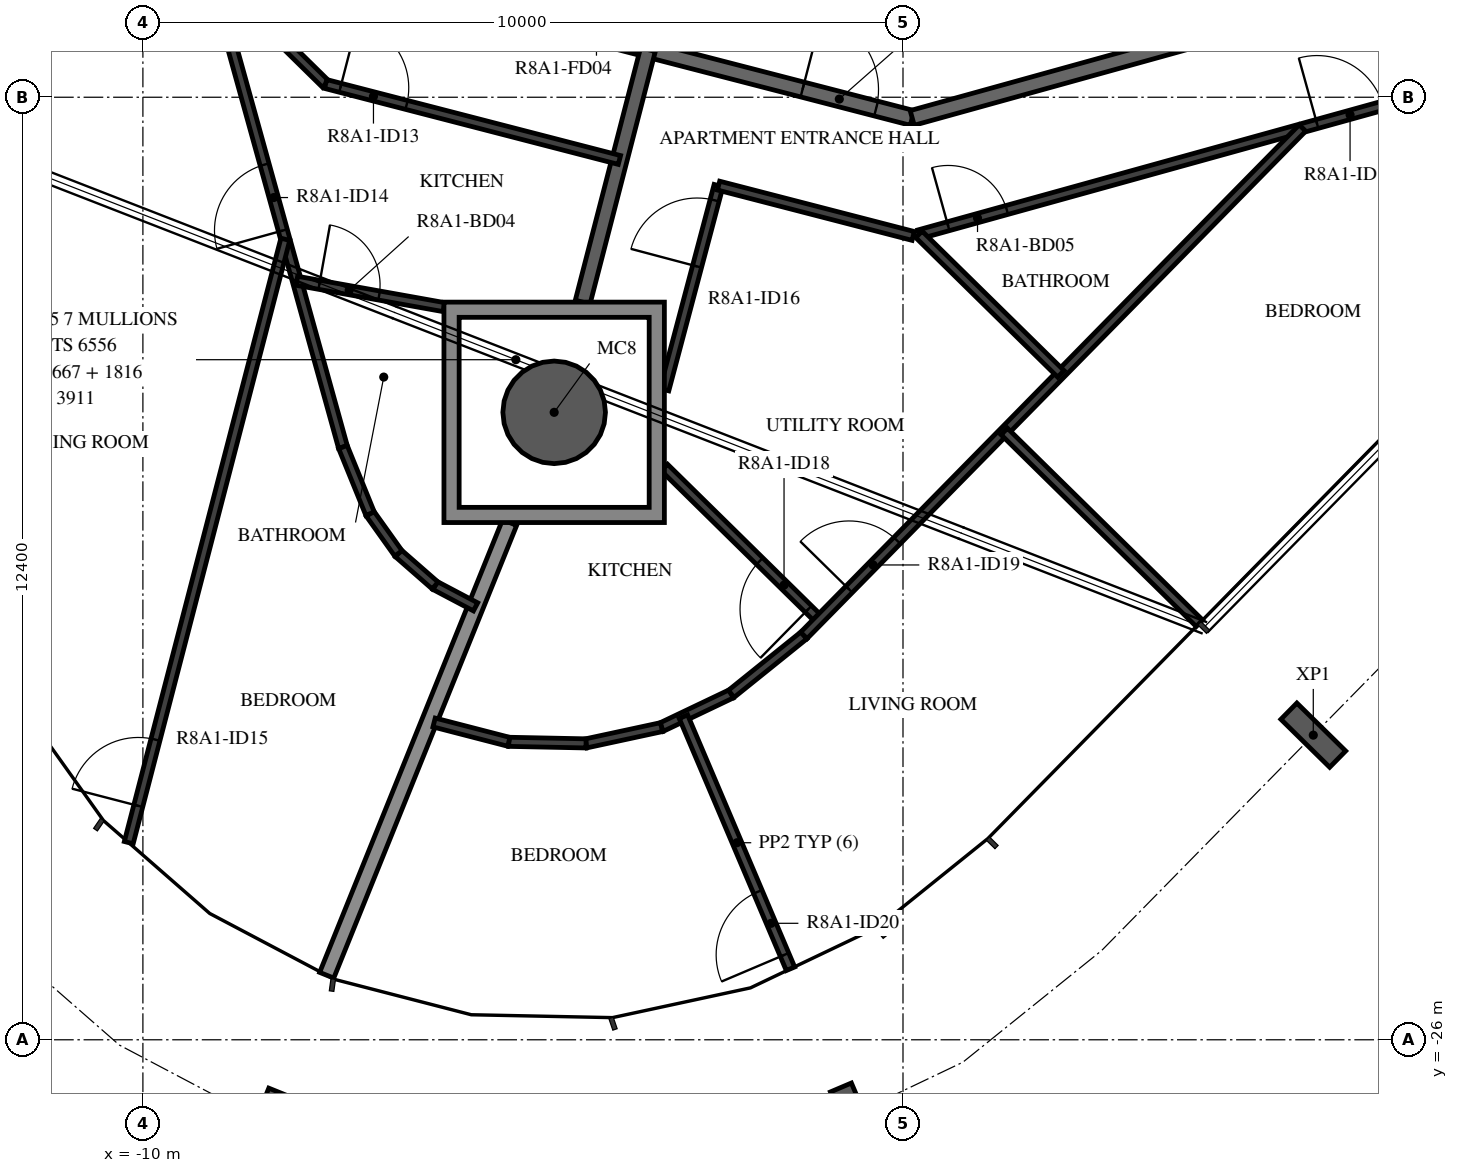
"""IFC4 building model, lengths in metres.
Left out: names, types, materials, properties, quantities, classifications, styles, units other than length and angle.
Written with IfcOpenShell. Run it as: python <this file> out.ifc"""

import sys

from ifc_helpers import new_model, si_unit, direction, frame, frame_2d, origin, origin_2d, place, context, subcontext, project, spatial, polyline, rectangle, hollow_circle, i_section, outline, extrude, element, fill, save


model = new_model("IFC4")
c1 = context("Model", 3, precision=1e-05, world=origin(), true_north=direction((0.0, 1.0)))
c2 = subcontext(c1, "Body", "Model", "MODEL_VIEW")
j1 = project(units=[si_unit("LENGTHUNIT", "METRE"), si_unit("PLANEANGLEUNIT", "RADIAN")], contexts=[c1])
p1 = place(None, origin())
s1 = spatial("IfcSite", under=j1, at=p1, CompositionType="ELEMENT")
p2 = place(p1, origin())
s2 = spatial("IfcBuilding", under=s1, at=p2, CompositionType="ELEMENT")
p3 = place(p2, frame((0.0, 0.0, 301.7)))
s3 = spatial("IfcBuildingStorey", under=s2, at=p3, CompositionType="ELEMENT", Elevation=301.7)
p4 = place(p3, frame((-4.589, -17.745, -0.38), z_axis=(0.0, 0.0, 1.0), x_axis=(1.0, 0.0, 0.0)))
e1 = element("IfcColumn", 1, at=p4, inside=s3, PredefinedType="COLUMN", context=c2, shape_type="SweptSolid", body=[
    extrude(hollow_circle(Radius=0.675, WallThickness=0.03, at=origin_2d()), origin(), (0.0, 0.0, 1.0), 3.5),
])
for number, where, z_axis, x_axis in (
    (2, (-8.373, -27.11, -0.38), (0.0, 0.0, 1.0), (-0.927, 0.375, 0.0)),
    (3, (-0.641, -27.042, -0.38), (0.0, 0.0, 1.0), (-0.92, -0.391, 0.0)),
    (4, (5.398, -21.992, -0.38), (0.0, 0.0, 1.0), (-0.701, -0.713, 0.0)),
):
    element("IfcColumn", number, at=place(p3, frame(where, z_axis=z_axis, x_axis=x_axis)), inside=s3, PredefinedType="COLUMN", context=c2, shape_type="SweptSolid", body=[
        extrude(i_section(OverallWidth=0.3, OverallDepth=0.9, WebThickness=0.019, FlangeThickness=0.035, FilletRadius=0.03, at=origin_2d()), origin(), (0.0, 0.0, 1.0), 3.5),
    ])
p5 = place(p3, frame((-6.831, -12.074, 0.0), z_axis=(0.0, 0.0, 1.0), x_axis=(0.968144780225, -0.250391063186, 0.0)))
e5 = element("IfcWall", 5, at=p5, inside=s3, PredefinedType="STANDARD", context=c2, shape_type="SweptSolid", body=[
    extrude(rectangle(XDim=7.181, YDim=0.2, at=frame_2d((3.591, 0.0))), origin(), (0.0, 0.0, 1.0), 3.12),
])
p6 = place(p5, frame((2.39, 0.0, 0.0)))
e6 = element("IfcOpeningElement", 6, at=p6, cuts=e5, PredefinedType="OPENING", context=c2, shape_type="SweptSolid", body=[
    extrude(rectangle(XDim=1.0, YDim=2.1, at=frame_2d((0.5, 1.05))), frame((0.0, 0.11, 0.0), z_axis=(0.0, -1.0, 0.0), x_axis=(1.0, 0.0, 0.0)), (0.0, 0.0, 1.0), 0.22),
])
p7 = place(p5, frame((5.69, 0.0, 0.0)))
e7 = element("IfcOpeningElement", 7, at=p7, cuts=e5, PredefinedType="OPENING", context=c2, shape_type="SweptSolid", body=[
    extrude(rectangle(XDim=1.0, YDim=2.1, at=frame_2d((0.5, 1.05))), frame((0.0, 0.11, 0.0), z_axis=(0.0, -1.0, 0.0), x_axis=(1.0, 0.0, 0.0)), (0.0, 0.0, 1.0), 0.22),
])
p8 = place(p3, frame((0.121, -13.872, 0.0), z_axis=(0.0, 0.0, 1.0), x_axis=(0.963625960674, 0.267254575108, 0.0)))
e8 = element("IfcWall", 8, at=p8, inside=s3, PredefinedType="STANDARD", context=c2, shape_type="SweptSolid", body=[
    extrude(rectangle(XDim=7.181, YDim=0.2, at=frame_2d((3.591, 0.0))), origin(), (0.0, 0.0, 1.0), 3.12),
])
p9 = place(p3, frame((-4.214, -16.295, 0.0), z_axis=(0.0, 0.0, 1.0), x_axis=(0.250428810918, 0.968135016752, 0.0)))
e9 = element("IfcWall", 9, at=p9, inside=s3, PredefinedType="STANDARD", context=c2, shape_type="SweptSolid", body=[
    extrude(rectangle(XDim=3.432, YDim=0.2, at=frame_2d((1.716, 0.0))), origin(), (0.0, 0.0, 1.0), 3.12),
])
p10 = place(p3, frame((-7.582, -25.151, 0.0), z_axis=(0.0, 0.0, 1.0), x_axis=(0.374645287615, 0.927168220156, 0.0)))
e10 = element("IfcWall", 10, at=p10, inside=s3, PredefinedType="STANDARD", context=c2, shape_type="SweptSolid", body=[
    extrude(rectangle(XDim=6.423, YDim=0.2, at=frame_2d((3.212, 0.0))), origin(), (0.0, 0.0, 1.0), 2.73),
])
p11 = place(p3, frame((-10.59, -10.483, 0.0), z_axis=(0.0, 0.0, 1.0), x_axis=(0.713244109461, -0.70091571556, 0.0)))
e11 = element("IfcWall", 11, at=p11, inside=s3, PredefinedType="PARTITIONING", context=c2, shape_type="SweptSolid", body=[
    extrude(rectangle(XDim=4.198, YDim=0.12, at=frame_2d((2.099, 0.0))), origin(), (0.0, 0.0, 1.0), 3.12),
])
p12 = place(p3, frame((-7.596, -13.426, 0.0), z_axis=(0.0, 0.0, 1.0), x_axis=(0.96815406745, -0.250355151095, 0.0)))
e12 = element("IfcWall", 12, at=p12, inside=s3, PredefinedType="PARTITIONING", context=c2, shape_type="SweptSolid", body=[
    extrude(rectangle(XDim=3.992, YDim=0.12, at=frame_2d((1.996, 0.0))), origin(), (0.0, 0.0, 1.0), 3.12),
])
p13 = place(p12, frame((0.2, 0.0, 0.0)))
e13 = element("IfcOpeningElement", 13, at=p13, cuts=e12, PredefinedType="OPENING", context=c2, shape_type="SweptSolid", body=[
    extrude(rectangle(XDim=0.9, YDim=2.1, at=frame_2d((0.45, 1.05))), frame((0.0, 0.07, 0.0), z_axis=(0.0, -1.0, 0.0), x_axis=(1.0, 0.0, 0.0)), (0.0, 0.0, 1.0), 0.14),
])
p14 = place(p3, frame((-14.066, -13.508, 0.0), z_axis=(0.0, 0.0, 1.0), x_axis=(0.963643585504, 0.267191018032, 0.0)))
e14 = element("IfcWall", 14, at=p14, inside=s3, PredefinedType="PARTITIONING", context=c2, shape_type="SweptSolid", body=[
    extrude(rectangle(XDim=5.2, YDim=0.12, at=frame_2d((2.6, 0.0))), origin(), (0.0, 0.0, 1.0), 2.73),
])
p15 = place(p3, frame((-7.368, -18.202, 0.0), z_axis=(0.0, 0.0, 1.0), x_axis=(-0.26723158658, 0.963632336077, 0.0)))
e15 = element("IfcWall", 15, at=p15, inside=s3, PredefinedType="PARTITIONING", context=c2, shape_type="SweptSolid", body=[
    extrude(rectangle(XDim=6.353, YDim=0.12, at=frame_2d((3.177, 0.0))), origin(), (0.0, 0.0, 1.0), 3.12),
])
p16 = place(p15, frame((2.956, 0.0, 0.0)))
e16 = element("IfcOpeningElement", 16, at=p16, cuts=e15, PredefinedType="OPENING", context=c2, shape_type="SweptSolid", body=[
    extrude(rectangle(XDim=0.9, YDim=2.1, at=frame_2d((0.45, 1.05))), frame((0.0, 0.07, 0.0), z_axis=(0.0, -1.0, 0.0), x_axis=(1.0, 0.0, 0.0)), (0.0, 0.0, 1.0), 0.14),
])
p17 = place(p3, frame((-10.186, -23.406, 0.0), z_axis=(0.0, 0.0, 1.0), x_axis=(0.251184292323, 0.967939280787, 0.0)))
e17 = element("IfcWall", 17, at=p17, inside=s3, PredefinedType="PARTITIONING", context=c2, shape_type="SweptSolid", body=[
    extrude(rectangle(XDim=8.2, YDim=0.12, at=frame_2d((4.1, 0.0))), origin(), (0.0, 0.0, 1.0), 3.12),
])
p18 = place(p17, frame((0.5, 0.0, 0.0)))
e18 = element("IfcOpeningElement", 18, at=p18, cuts=e17, PredefinedType="OPENING", context=c2, shape_type="SweptSolid", body=[
    extrude(rectangle(XDim=0.9, YDim=2.1, at=frame_2d((0.45, 1.05))), frame((0.0, 0.07, 0.0), z_axis=(0.0, -1.0, 0.0), x_axis=(1.0, 0.0, 0.0)), (0.0, 0.0, 1.0), 0.14),
])
p19 = place(p3, frame((-7.975, -16.015, 0.0), z_axis=(0.0, 0.0, 1.0), x_axis=(0.984356897167, -0.176185978441, 0.0)))
e19 = element("IfcWall", 19, at=p19, inside=s3, PredefinedType="PARTITIONING", context=c2, shape_type="SweptSolid", body=[
    extrude(rectangle(XDim=1.966, YDim=0.12, at=frame_2d((0.983, 0.0))), origin(), (0.0, 0.0, 1.0), 3.12),
])
p20 = place(p19, frame((0.3, 0.0, 0.0)))
e20 = element("IfcOpeningElement", 20, at=p20, cuts=e19, PredefinedType="OPENING", context=c2, shape_type="SweptSolid", body=[
    extrude(rectangle(XDim=0.8, YDim=2.1, at=frame_2d((0.4, 1.05))), frame((0.0, 0.07, 0.0), z_axis=(0.0, -1.0, 0.0), x_axis=(1.0, 0.0, 0.0)), (0.0, 0.0, 1.0), 0.14),
])
p21 = place(p3, frame((-5.623, -20.305, 0.0), z_axis=(0.0, 0.0, 1.0), x_axis=(-0.884133271246, 0.467234800369, 0.0)))
e21 = element("IfcWall", 21, at=p21, inside=s3, PredefinedType="PARTITIONING", context=c2, shape_type="SweptSolid", body=[
    extrude(rectangle(XDim=0.601, YDim=0.12, at=frame_2d((0.301, 0.0))), origin(), (0.0, 0.0, 1.0), 3.12),
])
p22 = place(p3, frame((-6.155, -20.024, 0.0), z_axis=(0.0, 0.0, 1.0), x_axis=(-0.753047703781, 0.657965923001, 0.0)))
e22 = element("IfcWall", 22, at=p22, inside=s3, PredefinedType="PARTITIONING", context=c2, shape_type="SweptSolid", body=[
    extrude(rectangle(XDim=0.642, YDim=0.12, at=frame_2d((0.321, 0.0))), origin(), (0.0, 0.0, 1.0), 3.12),
])
p23 = place(p3, frame((-6.638, -19.601, 0.0), z_axis=(0.0, 0.0, 1.0), x_axis=(-0.580662514246, 0.814144363458, 0.0)))
e23 = element("IfcWall", 23, at=p23, inside=s3, PredefinedType="PARTITIONING", context=c2, shape_type="SweptSolid", body=[
    extrude(rectangle(XDim=0.642, YDim=0.12, at=frame_2d((0.321, 0.0))), origin(), (0.0, 0.0, 1.0), 3.12),
])
p24 = place(p3, frame((-7.011, -19.079, 0.0), z_axis=(0.0, 0.0, 1.0), x_axis=(-0.377296887314, 0.92609235977, 0.0)))
e24 = element("IfcWall", 24, at=p24, inside=s3, PredefinedType="PARTITIONING", context=c2, shape_type="SweptSolid", body=[
    extrude(rectangle(XDim=0.947, YDim=0.12, at=frame_2d((0.473, 0.0))), origin(), (0.0, 0.0, 1.0), 3.12),
])
p25 = place(p3, frame((-3.139, -17.448, 0.0), z_axis=(0.0, 0.0, 1.0), x_axis=(0.256551998295, 0.966530430028, 0.0)))
e25 = element("IfcWall", 25, at=p25, inside=s3, PredefinedType="PARTITIONING", context=c2, shape_type="SweptSolid", body=[
    extrude(rectangle(XDim=2.778, YDim=0.12, at=frame_2d((1.389, 0.0))), origin(), (0.0, 0.0, 1.0), 3.12),
])
p26 = place(p25, frame((1.678, 0.0, 0.0)))
e26 = element("IfcOpeningElement", 26, at=p26, cuts=e25, PredefinedType="OPENING", context=c2, shape_type="SweptSolid", body=[
    extrude(rectangle(XDim=0.9, YDim=2.1, at=frame_2d((0.45, 1.05))), frame((0.0, 0.07, 0.0), z_axis=(0.0, -1.0, 0.0), x_axis=(1.0, 0.0, 0.0)), (0.0, 0.0, 1.0), 0.14),
])
p27 = place(p3, frame((-2.427, -14.763, 0.0), z_axis=(0.0, 0.0, 1.0), x_axis=(0.968151154118, -0.250366417036, 0.0)))
e27 = element("IfcWall", 27, at=p27, inside=s3, PredefinedType="PARTITIONING", context=c2, shape_type="SweptSolid", body=[
    extrude(rectangle(XDim=2.646, YDim=0.12, at=frame_2d((1.323, 0.0))), origin(), (0.0, 0.0, 1.0), 3.12),
])
p28 = place(p3, frame((0.21, -15.404, 0.0), z_axis=(0.0, 0.0, 1.0), x_axis=(0.963630625717, 0.267237754032, 0.0)))
e28 = element("IfcWall", 28, at=p28, inside=s3, PredefinedType="PARTITIONING", context=c2, shape_type="SweptSolid", body=[
    extrude(rectangle(XDim=7.907, YDim=0.12, at=frame_2d((3.954, 0.0))), origin(), (0.0, 0.0, 1.0), 3.12),
])
p29 = place(p28, frame((0.4, 0.0, 0.0)))
e29 = element("IfcOpeningElement", 29, at=p29, cuts=e28, PredefinedType="OPENING", context=c2, shape_type="SweptSolid", body=[
    extrude(rectangle(XDim=0.8, YDim=2.1, at=frame_2d((0.4, 1.05))), frame((0.0, 0.07, 0.0), z_axis=(0.0, -1.0, 0.0), x_axis=(1.0, 0.0, 0.0)), (0.0, 0.0, 1.0), 0.14),
])
p30 = place(p28, frame((5.436, 0.0, 0.0)))
e30 = element("IfcOpeningElement", 30, at=p30, cuts=e28, PredefinedType="OPENING", context=c2, shape_type="SweptSolid", body=[
    extrude(rectangle(XDim=0.9, YDim=2.1, at=frame_2d((0.45, 1.05))), frame((0.0, 0.07, 0.0), z_axis=(0.0, -1.0, 0.0), x_axis=(1.0, 0.0, 0.0)), (0.0, 0.0, 1.0), 0.14),
])
p31 = place(p3, frame((-2.26, -21.449, 0.0), z_axis=(0.0, 0.0, 1.0), x_axis=(-0.90254047062, -0.430605038166, 0.0)))
e31 = element("IfcWall", 31, at=p31, inside=s3, PredefinedType="PARTITIONING", context=c2, shape_type="SweptSolid", body=[
    extrude(rectangle(XDim=1.016, YDim=0.12, at=frame_2d((0.508, 0.0))), origin(), (0.0, 0.0, 1.0), 3.12),
])
for number, where, z_axis, x_axis in (
    (32, (-3.177, -21.887, 0.0), (0.0, 0.0, 1.0), (-0.978, -0.211, 0.0)),
    (33, (-4.17, -22.101, 0.0), (0.0, 0.0, 1.0), (-1.0, 0.02, 0.0)),
):
    element("IfcWall", number, at=place(p3, frame(where, z_axis=z_axis, x_axis=x_axis)), inside=s3, PredefinedType="PARTITIONING", context=c2, shape_type="SweptSolid", body=[
        extrude(rectangle(XDim=1.016, YDim=0.12, at=frame_2d((0.508, 0.0))), origin(), (0.0, 0.0, 1.0), 3.12),
    ])
p32 = place(p3, frame((-5.186, -22.08, 0.0), z_axis=(0.0, 0.0, 1.0), x_axis=(-0.968145907309, 0.250386705241, 0.0)))
e34 = element("IfcWall", 34, at=p32, inside=s3, PredefinedType="PARTITIONING", context=c2, shape_type="SweptSolid", body=[
    extrude(rectangle(XDim=1.016, YDim=0.12, at=frame_2d((0.508, 0.0))), origin(), (0.0, 0.0, 1.0), 3.12),
])
p33 = place(p3, frame((-1.48, -25.066, 0.0), z_axis=(0.0, 0.0, 1.0), x_axis=(-0.3909326022, 0.920419306912, 0.0)))
e35 = element("IfcWall", 35, at=p33, inside=s3, PredefinedType="PARTITIONING", context=c2, shape_type="SweptSolid", body=[
    extrude(rectangle(XDim=3.604, YDim=0.12, at=frame_2d((1.802, 0.0))), origin(), (0.0, 0.0, 1.0), 2.73),
])
p34 = place(p33, frame((0.2, 0.0, 0.0)))
e36 = element("IfcOpeningElement", 36, at=p34, cuts=e35, PredefinedType="OPENING", context=c2, shape_type="SweptSolid", body=[
    extrude(rectangle(XDim=0.9, YDim=2.1, at=frame_2d((0.45, 1.05))), frame((0.0, 0.07, 0.0), z_axis=(0.0, -1.0, 0.0), x_axis=(1.0, 0.0, 0.0)), (0.0, 0.0, 1.0), 0.14),
])
p35 = place(p3, frame((-1.101, -20.474, 0.0), z_axis=(0.0, 0.0, 1.0), x_axis=(-0.713316946232, 0.700841589961, 0.0)))
e37 = element("IfcWall", 37, at=p35, inside=s3, PredefinedType="PARTITIONING", context=c2, shape_type="SweptSolid", body=[
    extrude(rectangle(XDim=2.857, YDim=0.12, at=frame_2d((1.429, 0.0))), origin(), (0.0, 0.0, 1.0), 3.12),
])
p36 = place(p35, frame((0.2, 0.0, 0.0)))
e38 = element("IfcOpeningElement", 38, at=p36, cuts=e37, PredefinedType="OPENING", context=c2, shape_type="SweptSolid", body=[
    extrude(rectangle(XDim=0.9, YDim=2.1, at=frame_2d((0.45, 1.05))), frame((0.0, 0.07, 0.0), z_axis=(0.0, -1.0, 0.0), x_axis=(1.0, 0.0, 0.0)), (0.0, 0.0, 1.0), 0.14),
])
p37 = place(p3, frame((-2.26, -21.449, 0.0), z_axis=(0.0, 0.0, 1.0), x_axis=(0.779021167429, 0.626997624156, 0.0)))
e39 = element("IfcWall", 39, at=p37, inside=s3, PredefinedType="PARTITIONING", context=c2, shape_type="SweptSolid", body=[
    extrude(rectangle(XDim=1.227, YDim=0.12, at=frame_2d((0.614, 0.0))), origin(), (0.0, 0.0, 1.0), 3.12),
])
p38 = place(p3, frame((-1.304, -20.68, 0.0), z_axis=(0.0, 0.0, 1.0), x_axis=(0.700896976526, 0.713262524108, 0.0)))
e40 = element("IfcWall", 40, at=p38, inside=s3, PredefinedType="PARTITIONING", context=c2, shape_type="SweptSolid", body=[
    extrude(rectangle(XDim=9.358, YDim=0.12, at=frame_2d((4.679, 0.0))), origin(), (0.0, 0.0, 1.0), 3.12),
])
p39 = place(p38, frame((0.849, 0.0, 0.0)))
e41 = element("IfcOpeningElement", 41, at=p39, cuts=e40, PredefinedType="OPENING", context=c2, shape_type="SweptSolid", body=[
    extrude(rectangle(XDim=0.9, YDim=2.1, at=frame_2d((0.45, 1.05))), frame((0.0, 0.07, 0.0), z_axis=(0.0, -1.0, 0.0), x_axis=(1.0, 0.0, 0.0)), (0.0, 0.0, 1.0), 0.14),
])
p40 = place(p3, frame((2.077, -17.239, 0.0), z_axis=(0.0, 0.0, 1.0), x_axis=(-0.713235001716, 0.700924983381, 0.0)))
e42 = element("IfcWall", 42, at=p40, inside=s3, PredefinedType="PARTITIONING", context=c2, shape_type="SweptSolid", body=[
    extrude(rectangle(XDim=2.618, YDim=0.12, at=frame_2d((1.309, 0.0))), origin(), (0.0, 0.0, 1.0), 3.12),
])
p41 = place(p3, frame((3.9, -20.521, 0.0), z_axis=(0.0, 0.0, 1.0), x_axis=(-0.713217465002, 0.700942827637, 0.0)))
e43 = element("IfcWall", 43, at=p41, inside=s3, PredefinedType="PARTITIONING", context=c2, shape_type="SweptSolid", body=[
    extrude(rectangle(XDim=3.6, YDim=0.12, at=frame_2d((1.8, 0.0))), origin(), (0.0, 0.0, 1.0), 2.73),
])
p42 = place(p3, origin())
e44 = element("IfcWall", 44, at=p42, inside=s3, PredefinedType="STANDARD", context=c2, shape_type="SweptSolid", body=[
    extrude(outline(polyline([(-3.139, -16.295), (-3.139, -19.195), (-6.039, -19.195), (-6.039, -16.295), (-3.139, -16.295)]), holes=[polyline([(-5.839, -18.995), (-3.339, -18.995), (-3.339, -16.495), (-5.839, -16.495), (-5.839, -18.995)])]), origin(), (0.0, 0.0, 1.0), 3.12),
])
p43 = place(p13, origin())
e45 = element("IfcDoor", 45, at=p43, inside=s3, OperationType="SINGLE_SWING_RIGHT", PredefinedType="DOOR", context=c2, shape_type="SweptSolid", body=[
    extrude(rectangle(XDim=0.9, YDim=2.1, at=frame_2d((0.45, 1.05))), frame((0.0, 0.025, 0.0), z_axis=(0.0, -1.0, 0.0), x_axis=(1.0, 0.0, 0.0)), (0.0, 0.0, 1.0), 0.05),
])
fill(e13, e45)
p44 = place(p16, origin())
e46 = element("IfcDoor", 46, at=p44, inside=s3, OperationType="SINGLE_SWING_RIGHT", PredefinedType="DOOR", context=c2, shape_type="SweptSolid", body=[
    extrude(rectangle(XDim=0.9, YDim=2.1, at=frame_2d((0.45, 1.05))), frame((0.0, 0.025, 0.0), z_axis=(0.0, -1.0, 0.0), x_axis=(1.0, 0.0, 0.0)), (0.0, 0.0, 1.0), 0.05),
])
fill(e16, e46)
p45 = place(p18, origin())
e47 = element("IfcDoor", 47, at=p45, inside=s3, OperationType="SINGLE_SWING_RIGHT", PredefinedType="DOOR", context=c2, shape_type="SweptSolid", body=[
    extrude(rectangle(XDim=0.9, YDim=2.1, at=frame_2d((0.45, 1.05))), frame((0.0, 0.025, 0.0), z_axis=(0.0, -1.0, 0.0), x_axis=(1.0, 0.0, 0.0)), (0.0, 0.0, 1.0), 0.05),
])
fill(e18, e47)
p46 = place(p20, origin())
e48 = element("IfcDoor", 48, at=p46, inside=s3, OperationType="SINGLE_SWING_RIGHT", PredefinedType="DOOR", context=c2, shape_type="SweptSolid", body=[
    extrude(rectangle(XDim=0.8, YDim=2.1, at=frame_2d((0.4, 1.05))), frame((0.0, 0.025, 0.0), z_axis=(0.0, -1.0, 0.0), x_axis=(1.0, 0.0, 0.0)), (0.0, 0.0, 1.0), 0.05),
])
fill(e20, e48)
p47 = place(p7, origin())
e49 = element("IfcDoor", 49, at=p47, inside=s3, OperationType="SINGLE_SWING_LEFT", PredefinedType="DOOR", context=c2, shape_type="SweptSolid", body=[
    extrude(rectangle(XDim=1.0, YDim=2.1, at=frame_2d((0.5, 1.05))), frame((0.0, 0.025, 0.0), z_axis=(0.0, -1.0, 0.0), x_axis=(1.0, 0.0, 0.0)), (0.0, 0.0, 1.0), 0.05),
])
fill(e7, e49)
p48 = place(p26, origin())
e50 = element("IfcDoor", 50, at=p48, inside=s3, OperationType="SINGLE_SWING_LEFT", PredefinedType="DOOR", context=c2, shape_type="SweptSolid", body=[
    extrude(rectangle(XDim=0.9, YDim=2.1, at=frame_2d((0.45, 1.05))), frame((0.0, 0.025, 0.0), z_axis=(0.0, -1.0, 0.0), x_axis=(1.0, 0.0, 0.0)), (0.0, 0.0, 1.0), 0.05),
])
fill(e26, e50)
p49 = place(p29, origin())
e51 = element("IfcDoor", 51, at=p49, inside=s3, OperationType="SINGLE_SWING_LEFT", PredefinedType="DOOR", context=c2, shape_type="SweptSolid", body=[
    extrude(rectangle(XDim=0.8, YDim=2.1, at=frame_2d((0.4, 1.05))), frame((0.0, 0.025, 0.0), z_axis=(0.0, -1.0, 0.0), x_axis=(1.0, 0.0, 0.0)), (0.0, 0.0, 1.0), 0.05),
])
fill(e29, e51)
p50 = place(p30, origin())
e52 = element("IfcDoor", 52, at=p50, inside=s3, OperationType="SINGLE_SWING_LEFT", PredefinedType="DOOR", context=c2, shape_type="SweptSolid", body=[
    extrude(rectangle(XDim=0.9, YDim=2.1, at=frame_2d((0.45, 1.05))), frame((0.0, 0.025, 0.0), z_axis=(0.0, -1.0, 0.0), x_axis=(1.0, 0.0, 0.0)), (0.0, 0.0, 1.0), 0.05),
])
fill(e30, e52)
p51 = place(p36, origin())
e53 = element("IfcDoor", 53, at=p51, inside=s3, OperationType="SINGLE_SWING_LEFT", PredefinedType="DOOR", context=c2, shape_type="SweptSolid", body=[
    extrude(rectangle(XDim=0.9, YDim=2.1, at=frame_2d((0.45, 1.05))), frame((0.0, 0.025, 0.0), z_axis=(0.0, -1.0, 0.0), x_axis=(1.0, 0.0, 0.0)), (0.0, 0.0, 1.0), 0.05),
])
fill(e38, e53)
p52 = place(p39, origin())
e54 = element("IfcDoor", 54, at=p52, inside=s3, OperationType="SINGLE_SWING_LEFT", PredefinedType="DOOR", context=c2, shape_type="SweptSolid", body=[
    extrude(rectangle(XDim=0.9, YDim=2.1, at=frame_2d((0.45, 1.05))), frame((0.0, 0.025, 0.0), z_axis=(0.0, -1.0, 0.0), x_axis=(1.0, 0.0, 0.0)), (0.0, 0.0, 1.0), 0.05),
])
fill(e41, e54)
p53 = place(p34, origin())
e55 = element("IfcDoor", 55, at=p53, inside=s3, OperationType="SINGLE_SWING_LEFT", PredefinedType="DOOR", context=c2, shape_type="SweptSolid", body=[
    extrude(rectangle(XDim=0.9, YDim=2.1, at=frame_2d((0.45, 1.05))), frame((0.0, 0.025, 0.0), z_axis=(0.0, -1.0, 0.0), x_axis=(1.0, 0.0, 0.0)), (0.0, 0.0, 1.0), 0.05),
])
fill(e36, e55)
save(model, sys.argv[1])
